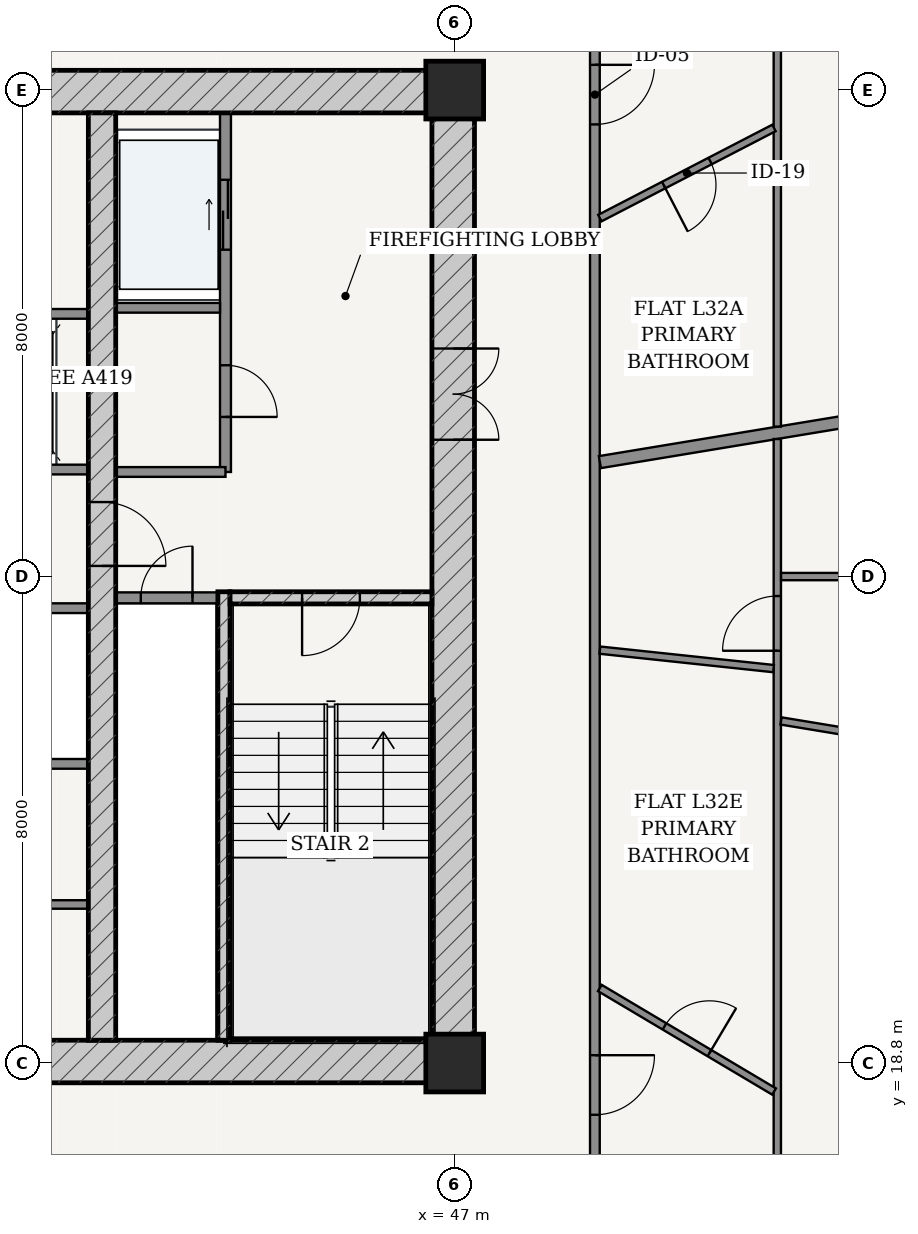
"""IFC4 building model, lengths in metres.
Left out: names, types, materials, properties, quantities, classifications, styles, units other than length and angle.
Written with IfcOpenShell. Run it as: python <this file> out.ifc"""

import sys

from ifc_helpers import new_model, si_unit, direction, frame, frame_2d, origin, origin_2d, place, context, subcontext, project, spatial, rectangle, extrude, source, transform, mapped, element, fill, save


model = new_model("IFC4")
c1 = context("Model", 3, precision=1e-05, world=origin(), true_north=direction((-0.2419218956, 0.970295726276)))
c2 = subcontext(c1, "Body", "Model", "MODEL_VIEW")
j1 = project(units=[si_unit("LENGTHUNIT", "METRE"), si_unit("PLANEANGLEUNIT", "RADIAN")], contexts=[c1])
p1 = place(None, origin())
s1 = spatial("IfcSite", under=j1, at=p1, CompositionType="ELEMENT")
p2 = place(p1, origin())
s2 = spatial("IfcBuilding", under=s1, at=p2, CompositionType="ELEMENT")
p3 = place(p2, frame((0.0, 0.0, 123.0)))
s3 = spatial("IfcBuildingStorey", under=s2, at=p3, CompositionType="ELEMENT", Elevation=123.0)
for number, where, z_axis, x_axis in (
    (1, (47.0, 18.8, 0.0), (0.0, 0.0, 1.0), (1.0, 0.0, 0.0)),
    (2, (47.0, 34.8, 0.0), (0.0, 0.0, 1.0), (1.0, 0.0, 0.0)),
):
    element("IfcColumn", number, at=place(p3, frame(where, z_axis=z_axis, x_axis=x_axis)), inside=s3, PredefinedType="COLUMN", context=c2, shape_type="SweptSolid", body=[
        extrude(rectangle(XDim=0.95, YDim=0.95, at=origin_2d()), origin(), (0.0, 0.0, 1.0), 3.6),
    ])
p4 = place(p3, frame((28.675, 18.825, 0.0), z_axis=(0.0, 0.0, 1.0), x_axis=(1.0, 0.0, 0.0)))
e3 = element("IfcWall", 3, at=p4, inside=s3, PredefinedType="SHEAR", context=c2, shape_type="SweptSolid", body=[
    extrude(rectangle(XDim=18.65, YDim=0.7, at=frame_2d((9.325, 0.0))), origin(), (0.0, 0.0, 1.0), 3.325),
])
p5 = place(p4, frame((8.9, 0.0, 0.0)))
e4 = element("IfcOpeningElement", 4, at=p5, cuts=e3, PredefinedType="OPENING", context=c2, shape_type="SweptSolid", body=[
    extrude(rectangle(XDim=0.85, YDim=2.1, at=frame_2d((0.425, 1.05))), frame((0.0, 0.36, 0.0), z_axis=(0.0, -1.0, 0.0), x_axis=(1.0, 0.0, 0.0)), (0.0, 0.0, 1.0), 0.72),
])
p6 = place(p3, frame((28.675, 34.775, 0.0), z_axis=(0.0, 0.0, 1.0), x_axis=(1.0, 0.0, 0.0)))
e5 = element("IfcWall", 5, at=p6, inside=s3, PredefinedType="SHEAR", context=c2, shape_type="SweptSolid", body=[
    extrude(rectangle(XDim=18.65, YDim=0.7, at=frame_2d((9.325, 0.0))), origin(), (0.0, 0.0, 1.0), 3.325),
])
p7 = place(p6, frame((8.9, 0.0, 0.0)))
e6 = element("IfcOpeningElement", 6, at=p7, cuts=e5, PredefinedType="OPENING", context=c2, shape_type="SweptSolid", body=[
    extrude(rectangle(XDim=0.85, YDim=2.1, at=frame_2d((0.425, 1.05))), frame((0.0, 0.36, 0.0), z_axis=(0.0, -1.0, 0.0), x_axis=(1.0, 0.0, 0.0)), (0.0, 0.0, 1.0), 0.72),
])
p8 = place(p3, frame((46.975, 19.175, 0.0), z_axis=(0.0, 0.0, 1.0), x_axis=(0.0, 1.0, 0.0)))
e7 = element("IfcWall", 7, at=p8, inside=s3, PredefinedType="SHEAR", context=c2, shape_type="SweptSolid", body=[
    extrude(rectangle(XDim=15.25, YDim=0.7, at=frame_2d((7.625, 0.0))), origin(), (0.0, 0.0, 1.0), 3.325),
])
p9 = place(p8, frame((9.875, 0.0, 0.0)))
e8 = element("IfcOpeningElement", 8, at=p9, cuts=e7, PredefinedType="OPENING", context=c2, shape_type="SweptSolid", body=[
    extrude(rectangle(XDim=1.5, YDim=2.2, at=frame_2d((0.75, 1.1))), frame((0.0, 0.36, 0.0), z_axis=(0.0, -1.0, 0.0), x_axis=(1.0, 0.0, 0.0)), (0.0, 0.0, 1.0), 0.72),
])
p10 = place(p3, frame((43.205, 19.175, 0.0), z_axis=(0.0, 0.0, 1.0), x_axis=(0.0, 1.0, 0.0)))
e9 = element("IfcWall", 9, at=p10, inside=s3, PredefinedType="SOLIDWALL", context=c2, shape_type="SweptSolid", body=[
    extrude(rectangle(XDim=7.375, YDim=0.2, at=frame_2d((3.688, 0.0))), origin(), (0.0, 0.0, 1.0), 3.325),
])
p11 = place(p3, frame((43.305, 26.45, 0.0), z_axis=(0.0, 0.0, 1.0), x_axis=(1.0, 0.0, 0.0)))
e10 = element("IfcWall", 10, at=p11, inside=s3, PredefinedType="SOLIDWALL", context=c2, shape_type="SweptSolid", body=[
    extrude(rectangle(XDim=3.32, YDim=0.2, at=frame_2d((1.66, 0.0))), origin(), (0.0, 0.0, 1.0), 3.325),
])
p12 = place(p11, frame((1.185, 0.0, 0.0)))
e11 = element("IfcOpeningElement", 11, at=p12, cuts=e10, PredefinedType="OPENING", context=c2, shape_type="SweptSolid", body=[
    extrude(rectangle(XDim=0.95, YDim=2.15, at=frame_2d((0.475, 1.075))), frame((0.0, 0.11, 0.0), z_axis=(0.0, -1.0, 0.0), x_axis=(1.0, 0.0, 0.0)), (0.0, 0.0, 1.0), 0.22),
])
p13 = place(p3, frame((41.2, 19.175, 0.0), z_axis=(0.0, 0.0, 1.0), x_axis=(0.0, 1.0, 0.0)))
e12 = element("IfcWall", 12, at=p13, inside=s3, PredefinedType="SHEAR", context=c2, shape_type="SweptSolid", body=[
    extrude(rectangle(XDim=15.25, YDim=0.45, at=frame_2d((7.625, 0.0))), origin(), (0.0, 0.0, 1.0), 3.325),
])
p14 = place(p13, frame((7.8, 0.0, 0.0)))
e13 = element("IfcOpeningElement", 13, at=p14, cuts=e12, PredefinedType="OPENING", context=c2, shape_type="SweptSolid", body=[
    extrude(rectangle(XDim=1.05, YDim=2.15, at=frame_2d((0.525, 1.075))), frame((0.0, 0.235, 0.0), z_axis=(0.0, -1.0, 0.0), x_axis=(1.0, 0.0, 0.0)), (0.0, 0.0, 1.0), 0.47),
])
p15 = place(p3, frame((41.425, 26.45, 0.0), z_axis=(0.0, 0.0, 1.0), x_axis=(1.0, 0.0, 0.0)))
e14 = element("IfcWall", 14, at=p15, inside=s3, PredefinedType="PARTITIONING", context=c2, shape_type="SweptSolid", body=[
    extrude(rectangle(XDim=1.675, YDim=0.18, at=frame_2d((0.837, 0.0))), origin(), (0.0, 0.0, 1.0), 3.325),
])
p16 = place(p15, frame((0.413, 0.0, 0.0)))
e15 = element("IfcOpeningElement", 15, at=p16, cuts=e14, PredefinedType="OPENING", context=c2, shape_type="SweptSolid", body=[
    extrude(rectangle(XDim=0.85, YDim=2.1, at=frame_2d((0.425, 1.05))), frame((0.0, 0.1, 0.0), z_axis=(0.0, -1.0, 0.0), x_axis=(1.0, 0.0, 0.0)), (0.0, 0.0, 1.0), 0.2),
])
p17 = place(p3, frame((43.23, 28.52, 0.0), z_axis=(0.0, 0.0, 1.0), x_axis=(0.0, 1.0, 0.0)))
e16 = element("IfcWall", 16, at=p17, inside=s3, PredefinedType="PARTITIONING", context=c2, shape_type="SweptSolid", body=[
    extrude(rectangle(XDim=5.905, YDim=0.18, at=frame_2d((2.953, 0.0))), origin(), (0.0, 0.0, 1.0), 3.325),
])
p18 = place(p17, frame((0.905, 0.0, 0.0)))
e17 = element("IfcOpeningElement", 17, at=p18, cuts=e16, PredefinedType="OPENING", context=c2, shape_type="SweptSolid", body=[
    extrude(rectangle(XDim=0.85, YDim=2.1, at=frame_2d((0.425, 1.05))), frame((0.0, 0.1, 0.0), z_axis=(0.0, -1.0, 0.0), x_axis=(1.0, 0.0, 0.0)), (0.0, 0.0, 1.0), 0.2),
])
p19 = place(p17, frame((3.655, 0.0, 0.0)))
e18 = element("IfcOpeningElement", 18, at=p19, cuts=e16, PredefinedType="OPENING", context=c2, shape_type="SweptSolid", body=[
    extrude(rectangle(XDim=1.15, YDim=2.2, at=frame_2d((0.575, 1.1))), frame((0.0, 0.1, 0.0), z_axis=(0.0, -1.0, 0.0), x_axis=(1.0, 0.0, 0.0)), (0.0, 0.0, 1.0), 0.2),
])
p20 = place(p3, frame((41.425, 31.22, 0.0), z_axis=(0.0, 0.0, 1.0), x_axis=(1.0, 0.0, 0.0)))
e19 = element("IfcWall", 19, at=p20, inside=s3, PredefinedType="PARTITIONING", context=c2, shape_type="SweptSolid", body=[
    extrude(rectangle(XDim=1.715, YDim=0.16, at=frame_2d((0.857, 0.0))), origin(), (0.0, 0.0, 1.0), 3.325),
])
p21 = place(p3, frame((41.425, 28.52, 0.0), z_axis=(0.0, 0.0, 1.0), x_axis=(1.0, 0.0, 0.0)))
e20 = element("IfcWall", 20, at=p21, inside=s3, PredefinedType="PARTITIONING", context=c2, shape_type="SweptSolid", body=[
    extrude(rectangle(XDim=1.805, YDim=0.16, at=frame_2d((0.902, 0.0))), origin(), (0.0, 0.0, 1.0), 3.325),
])
p22 = place(p3, frame((35.025, 28.56, 0.0), z_axis=(0.0, 0.0, 1.0), x_axis=(1.0, 0.0, 0.0)))
e21 = element("IfcWall", 21, at=p22, inside=s3, PredefinedType="PARTITIONING", context=c2, shape_type="SweptSolid", body=[
    extrude(rectangle(XDim=5.95, YDim=0.16, at=frame_2d((2.975, 0.0))), origin(), (0.0, 0.0, 1.0), 3.325),
])
p23 = place(p22, frame((0.76, 0.0, 0.0)))
e22 = element("IfcOpeningElement", 22, at=p23, cuts=e21, PredefinedType="OPENING", context=c2, shape_type="SweptSolid", body=[
    extrude(rectangle(XDim=1.1, YDim=2.2, at=frame_2d((0.55, 1.1))), frame((0.0, 0.09, 0.0), z_axis=(0.0, -1.0, 0.0), x_axis=(1.0, 0.0, 0.0)), (0.0, 0.0, 1.0), 0.18),
])
p24 = place(p22, frame((2.425, 0.0, 0.0)))
e23 = element("IfcOpeningElement", 23, at=p24, cuts=e21, PredefinedType="OPENING", context=c2, shape_type="SweptSolid", body=[
    extrude(rectangle(XDim=1.1, YDim=2.2, at=frame_2d((0.55, 1.1))), frame((0.0, 0.09, 0.0), z_axis=(0.0, -1.0, 0.0), x_axis=(1.0, 0.0, 0.0)), (0.0, 0.0, 1.0), 0.18),
])
p25 = place(p22, frame((4.09, 0.0, 0.0)))
e24 = element("IfcOpeningElement", 24, at=p25, cuts=e21, PredefinedType="OPENING", context=c2, shape_type="SweptSolid", body=[
    extrude(rectangle(XDim=1.1, YDim=2.2, at=frame_2d((0.55, 1.1))), frame((0.0, 0.09, 0.0), z_axis=(0.0, -1.0, 0.0), x_axis=(1.0, 0.0, 0.0)), (0.0, 0.0, 1.0), 0.18),
])
for number, where, z_axis, x_axis in (
    (25, (35.025, 31.12, 0.0), (0.0, 0.0, 1.0), (1.0, 0.0, 0.0)),
    (26, (35.025, 26.28, 0.0), (0.0, 0.0, 1.0), (1.0, 0.0, 0.0)),
    (27, (35.025, 23.72, 0.0), (0.0, 0.0, 1.0), (1.0, 0.0, 0.0)),
):
    element("IfcWall", number, at=place(p3, frame(where, z_axis=z_axis, x_axis=x_axis)), inside=s3, PredefinedType="PARTITIONING", context=c2, shape_type="SweptSolid", body=[
        extrude(rectangle(XDim=5.95, YDim=0.16, at=frame_2d((2.975, 0.0))), origin(), (0.0, 0.0, 1.0), 3.325),
    ])
p26 = place(p3, frame((35.025, 21.407, 0.0), z_axis=(0.0, 0.0, 1.0), x_axis=(1.0, 0.0, 0.0)))
e28 = element("IfcWall", 28, at=p26, inside=s3, PredefinedType="PARTITIONING", context=c2, shape_type="SweptSolid", body=[
    extrude(rectangle(XDim=5.95, YDim=0.14, at=frame_2d((2.975, 0.0))), origin(), (0.0, 0.0, 1.0), 3.325),
])
p27 = place(p26, frame((2.55, 0.0, 0.0)))
e29 = element("IfcOpeningElement", 29, at=p27, cuts=e28, PredefinedType="OPENING", context=c2, shape_type="SweptSolid", body=[
    extrude(rectangle(XDim=0.85, YDim=2.1, at=frame_2d((0.425, 1.05))), frame((0.0, 0.08, 0.0), z_axis=(0.0, -1.0, 0.0), x_axis=(1.0, 0.0, 0.0)), (0.0, 0.0, 1.0), 0.16),
])
p28 = place(p3, frame((49.305, 16.575, 0.0), z_axis=(0.0, 0.0, 1.0), x_axis=(0.0, 1.0, 0.0)))
e30 = element("IfcWall", 30, at=p28, inside=s3, PredefinedType="PARTITIONING", context=c2, shape_type="SweptSolid", body=[
    extrude(rectangle(XDim=20.45, YDim=0.16, at=frame_2d((10.225, 0.0))), origin(), (0.0, 0.0, 1.0), 2.767),
])
p29 = place(p28, frame((17.66, 0.0, 0.0)))
e31 = element("IfcOpeningElement", 31, at=p29, cuts=e30, PredefinedType="OPENING", context=c2, shape_type="SweptSolid", body=[
    extrude(rectangle(XDim=0.98, YDim=2.2, at=frame_2d((0.49, 1.1))), frame((0.0, 0.09, 0.0), z_axis=(0.0, -1.0, 0.0), x_axis=(1.0, 0.0, 0.0)), (0.0, 0.0, 1.0), 0.18),
])
p30 = place(p28, frame((1.374, 0.0, 0.0)))
e32 = element("IfcOpeningElement", 32, at=p30, cuts=e30, PredefinedType="OPENING", context=c2, shape_type="SweptSolid", body=[
    extrude(rectangle(XDim=0.98, YDim=2.2, at=frame_2d((0.49, 1.1))), frame((0.0, 0.09, 0.0), z_axis=(0.0, -1.0, 0.0), x_axis=(1.0, 0.0, 0.0)), (0.0, 0.0, 1.0), 0.18),
])
p31 = place(p3, frame((49.387, 28.682, 0.0), z_axis=(0.0, 0.0, 1.0), x_axis=(0.986617934215, 0.163049231479, 0.0)))
e33 = element("IfcWall", 33, at=p31, inside=s3, PredefinedType="PARTITIONING", context=c2, shape_type="SweptSolid", body=[
    extrude(rectangle(XDim=14.785, YDim=0.2, at=frame_2d((7.392, 0.0))), origin(), (0.0, 0.0, 1.0), 2.767),
])
p32 = place(p3, frame((52.305, 40.105, 0.0), z_axis=(0.0, 0.0, 1.0), x_axis=(0.0, -1.0, 0.0)))
e34 = element("IfcWall", 34, at=p32, inside=s3, PredefinedType="PARTITIONING", context=c2, shape_type="SweptSolid", body=[
    extrude(rectangle(XDim=10.839, YDim=0.12, at=frame_2d((5.419, 0.0))), origin(), (0.0, 0.0, 1.0), 2.767),
])
p33 = place(p32, frame((2.675, 0.0, 0.0)))
e35 = element("IfcOpeningElement", 35, at=p33, cuts=e34, PredefinedType="OPENING", context=c2, shape_type="SweptSolid", body=[
    extrude(rectangle(XDim=0.9, YDim=2.15, at=frame_2d((0.45, 1.075))), frame((0.0, 0.07, 0.0), z_axis=(0.0, -1.0, 0.0), x_axis=(1.0, 0.0, 0.0)), (0.0, 0.0, 1.0), 0.14),
])
p34 = place(p3, frame((49.387, 32.695, 0.0), z_axis=(0.0, 0.0, 1.0), x_axis=(0.888069491277, 0.459709232737, 0.0)))
e36 = element("IfcWall", 36, at=p34, inside=s3, PredefinedType="PARTITIONING", context=c2, shape_type="SweptSolid", body=[
    extrude(rectangle(XDim=3.224, YDim=0.12, at=frame_2d((1.612, 0.0))), origin(), (0.0, 0.0, 1.0), 3.325),
])
p35 = place(p34, frame((1.182, 0.0, 0.0)))
e37 = element("IfcOpeningElement", 37, at=p35, cuts=e36, PredefinedType="OPENING", context=c2, shape_type="SweptSolid", body=[
    extrude(rectangle(XDim=0.86, YDim=2.15, at=frame_2d((0.43, 1.075))), frame((0.0, 0.07, 0.0), z_axis=(0.0, -1.0, 0.0), x_axis=(1.0, 0.0, 0.0)), (0.0, 0.0, 1.0), 0.14),
])
p36 = place(p3, frame((52.305, 29.062, 0.0), z_axis=(0.0, 0.0, 1.0), x_axis=(0.0, -1.0, 0.0)))
e38 = element("IfcWall", 38, at=p36, inside=s3, PredefinedType="PARTITIONING", context=c2, shape_type="SweptSolid", body=[
    extrude(rectangle(XDim=15.567, YDim=0.12, at=frame_2d((7.783, 0.0))), origin(), (0.0, 0.0, 1.0), 2.767),
])
p37 = place(p36, frame((12.535, 0.0, 0.0)))
e39 = element("IfcOpeningElement", 39, at=p37, cuts=e38, PredefinedType="OPENING", context=c2, shape_type="SweptSolid", body=[
    extrude(rectangle(XDim=0.9, YDim=2.15, at=frame_2d((0.45, 1.075))), frame((0.0, 0.07, 0.0), z_axis=(0.0, -1.0, 0.0), x_axis=(1.0, 0.0, 0.0)), (0.0, 0.0, 1.0), 0.14),
])
p38 = place(p36, frame((2.582, 0.0, 0.0)))
e40 = element("IfcOpeningElement", 40, at=p38, cuts=e38, PredefinedType="OPENING", context=c2, shape_type="SweptSolid", body=[
    extrude(rectangle(XDim=0.9, YDim=2.15, at=frame_2d((0.45, 1.075))), frame((0.0, 0.07, 0.0), z_axis=(0.0, -1.0, 0.0), x_axis=(1.0, 0.0, 0.0)), (0.0, 0.0, 1.0), 0.14),
])
p39 = place(p3, frame((52.366, 24.426, 0.0), z_axis=(0.0, 0.0, 1.0), x_axis=(0.986619012175, -0.163042708564, 0.0)))
e41 = element("IfcWall", 41, at=p39, inside=s3, PredefinedType="PARTITIONING", context=c2, shape_type="SweptSolid", body=[
    extrude(rectangle(XDim=11.765, YDim=0.12, at=frame_2d((5.883, 0.0))), origin(), (0.0, 0.0, 1.0), 2.767),
])
p40 = place(p39, frame((4.359, 0.0, 0.0)))
e42 = element("IfcOpeningElement", 42, at=p40, cuts=e41, PredefinedType="OPENING", context=c2, shape_type="SweptSolid", body=[
    extrude(rectangle(XDim=0.9, YDim=2.15, at=frame_2d((0.45, 1.075))), frame((0.0, 0.07, 0.0), z_axis=(0.0, -1.0, 0.0), x_axis=(1.0, 0.0, 0.0)), (0.0, 0.0, 1.0), 0.14),
])
p41 = place(p3, frame((52.367, 26.8, 0.0), z_axis=(0.0, 0.0, 1.0), x_axis=(1.0, 0.0, 0.0)))
e43 = element("IfcWall", 43, at=p41, inside=s3, PredefinedType="PARTITIONING", context=c2, shape_type="SweptSolid", body=[
    extrude(rectangle(XDim=12.173, YDim=0.12, at=frame_2d((6.086, 0.0))), origin(), (0.0, 0.0, 1.0), 2.767),
])
p42 = place(p41, frame((5.636, 0.0, 0.0)))
e44 = element("IfcOpeningElement", 44, at=p42, cuts=e43, PredefinedType="OPENING", context=c2, shape_type="SweptSolid", body=[
    extrude(rectangle(XDim=0.9, YDim=2.15, at=frame_2d((0.45, 1.075))), frame((0.0, 0.07, 0.0), z_axis=(0.0, -1.0, 0.0), x_axis=(1.0, 0.0, 0.0)), (0.0, 0.0, 1.0), 0.14),
])
p43 = place(p3, frame((49.387, 20.034, 0.0), z_axis=(0.0, 0.0, 1.0), x_axis=(0.859682842925, -0.510828160521, 0.0)))
e45 = element("IfcWall", 45, at=p43, inside=s3, PredefinedType="PARTITIONING", context=c2, shape_type="SweptSolid", body=[
    extrude(rectangle(XDim=3.333, YDim=0.12, at=frame_2d((1.666, 0.0))), origin(), (0.0, 0.0, 1.0), 3.325),
])
p44 = place(p43, frame((1.236, 0.0, 0.0)))
e46 = element("IfcOpeningElement", 46, at=p44, cuts=e45, PredefinedType="OPENING", context=c2, shape_type="SweptSolid", body=[
    extrude(rectangle(XDim=0.86, YDim=2.15, at=frame_2d((0.43, 1.075))), frame((0.0, 0.07, 0.0), z_axis=(0.0, -1.0, 0.0), x_axis=(1.0, 0.0, 0.0)), (0.0, 0.0, 1.0), 0.14),
])
p45 = place(p3, frame((49.387, 25.59, 0.0), z_axis=(0.0, 0.0, 1.0), x_axis=(0.99440393079, -0.105644793673, 0.0)))
e47 = element("IfcWall", 47, at=p45, inside=s3, PredefinedType="PARTITIONING", context=c2, shape_type="SweptSolid", body=[
    extrude(rectangle(XDim=2.873, YDim=0.12, at=frame_2d((1.436, 0.0))), origin(), (0.0, 0.0, 1.0), 3.325),
])
m1 = source(origin(), c2, "Body", "SweptSolid", [
    extrude(rectangle(XDim=1.5, YDim=2.2, at=frame_2d((0.75, 1.1))), frame((0.0, 0.025, 0.0), z_axis=(0.0, -1.0, 0.0), x_axis=(1.0, 0.0, 0.0)), (0.0, 0.0, 1.0), 0.05),
])
p46 = place(p9, frame((1.5, 0.0, 0.0), z_axis=(0.0, 0.0, 1.0), x_axis=(-1.0, 0.0, 0.0)))
e48 = element("IfcDoor", 48, at=p46, inside=s3, OperationType="DOUBLE_DOOR_SINGLE_SWING", PredefinedType="DOOR", context=c2, shape_type="MappedRepresentation", body=[
    mapped(m1, transform((0.0, 0.0, 0.0), scale=1.0)),
])
fill(e8, e48)
m2 = source(origin(), c2, "Body", "SweptSolid", [
    extrude(rectangle(XDim=1.05, YDim=2.15, at=frame_2d((0.525, 1.075))), frame((0.0, 0.025, 0.0), z_axis=(0.0, -1.0, 0.0), x_axis=(1.0, 0.0, 0.0)), (0.0, 0.0, 1.0), 0.05),
])
p47 = place(p14, frame((1.05, 0.0, 0.0), z_axis=(0.0, 0.0, 1.0), x_axis=(-1.0, 0.0, 0.0)))
e49 = element("IfcDoor", 49, at=p47, inside=s3, OperationType="SINGLE_SWING_RIGHT", PredefinedType="DOOR", context=c2, shape_type="MappedRepresentation", body=[
    mapped(m2, transform((0.0, 0.0, 0.0), scale=1.0)),
])
fill(e13, e49)
m3 = source(origin(), c2, "Body", "SweptSolid", [
    extrude(rectangle(XDim=0.95, YDim=2.15, at=frame_2d((0.475, 1.075))), frame((0.0, 0.025, 0.0), z_axis=(0.0, -1.0, 0.0), x_axis=(1.0, 0.0, 0.0)), (0.0, 0.0, 1.0), 0.05),
])
p48 = place(p12, frame((0.95, 0.0, 0.0), z_axis=(0.0, 0.0, 1.0), x_axis=(-1.0, 0.0, 0.0)))
e50 = element("IfcDoor", 50, at=p48, inside=s3, OperationType="SINGLE_SWING_RIGHT", PredefinedType="DOOR", context=c2, shape_type="MappedRepresentation", body=[
    mapped(m3, transform((0.0, 0.0, 0.0), scale=1.0)),
])
fill(e11, e50)
m4 = source(origin(), c2, "Body", "SweptSolid", [
    extrude(rectangle(XDim=0.85, YDim=2.1, at=frame_2d((0.425, 1.05))), frame((0.0, 0.025, 0.0), z_axis=(0.0, -1.0, 0.0), x_axis=(1.0, 0.0, 0.0)), (0.0, 0.0, 1.0), 0.05),
])
p49 = place(p16, origin())
e51 = element("IfcDoor", 51, at=p49, inside=s3, OperationType="SINGLE_SWING_RIGHT", PredefinedType="DOOR", context=c2, shape_type="MappedRepresentation", body=[
    mapped(m4, transform((0.0, 0.0, 0.0), scale=1.0)),
])
fill(e15, e51)
p50 = place(p18, frame((0.85, 0.0, 0.0), z_axis=(0.0, 0.0, 1.0), x_axis=(-1.0, 0.0, 0.0)))
e52 = element("IfcDoor", 52, at=p50, inside=s3, OperationType="SINGLE_SWING_RIGHT", PredefinedType="DOOR", context=c2, shape_type="MappedRepresentation", body=[
    mapped(m4, transform((0.0, 0.0, 0.0), scale=1.0)),
])
fill(e17, e52)
m5 = source(origin(), c2, "Body", "SweptSolid", [
    extrude(rectangle(XDim=1.15, YDim=2.2, at=frame_2d((0.575, 1.1))), frame((0.0, 0.025, 0.0), z_axis=(0.0, -1.0, 0.0), x_axis=(1.0, 0.0, 0.0)), (0.0, 0.0, 1.0), 0.05),
])
p51 = place(p19, origin())
e53 = element("IfcDoor", 53, at=p51, inside=s3, OperationType="DOUBLE_DOOR_SLIDING", PredefinedType="DOOR", context=c2, shape_type="MappedRepresentation", body=[
    mapped(m5, transform((0.0, 0.0, 0.0), scale=1.0)),
])
fill(e18, e53)
m6 = source(origin(), c2, "Body", "SweptSolid", [
    extrude(rectangle(XDim=0.98, YDim=2.2, at=frame_2d((0.49, 1.1))), frame((0.0, 0.025, 0.0), z_axis=(0.0, -1.0, 0.0), x_axis=(1.0, 0.0, 0.0)), (0.0, 0.0, 1.0), 0.05),
])
p52 = place(p29, frame((0.98, 0.0, 0.0), z_axis=(0.0, 0.0, 1.0), x_axis=(-1.0, 0.0, 0.0)))
e54 = element("IfcDoor", 54, at=p52, inside=s3, OperationType="SINGLE_SWING_LEFT", PredefinedType="DOOR", context=c2, shape_type="MappedRepresentation", body=[
    mapped(m6, transform((0.0, 0.0, 0.0), scale=1.0)),
])
fill(e31, e54)
m7 = source(origin(), c2, "Body", "SweptSolid", [
    extrude(rectangle(XDim=0.86, YDim=2.15, at=frame_2d((0.43, 1.075))), frame((0.0, 0.025, 0.0), z_axis=(0.0, -1.0, 0.0), x_axis=(1.0, 0.0, 0.0)), (0.0, 0.0, 1.0), 0.05),
])
p53 = place(p35, frame((0.86, 0.0, 0.0), z_axis=(0.0, 0.0, 1.0), x_axis=(-1.0, 0.0, 0.0)))
e55 = element("IfcDoor", 55, at=p53, inside=s3, OperationType="SINGLE_SWING_RIGHT", PredefinedType="DOOR", context=c2, shape_type="MappedRepresentation", body=[
    mapped(m7, transform((0.0, 0.0, 0.0), scale=1.0)),
])
fill(e37, e55)
p54 = place(p30, frame((0.98, 0.0, 0.0), z_axis=(0.0, 0.0, 1.0), x_axis=(-1.0, 0.0, 0.0)))
e56 = element("IfcDoor", 56, at=p54, inside=s3, OperationType="SINGLE_SWING_LEFT", PredefinedType="DOOR", context=c2, shape_type="MappedRepresentation", body=[
    mapped(m6, transform((0.0, 0.0, 0.0), scale=1.0)),
])
fill(e32, e56)
p55 = place(p44, origin())
e57 = element("IfcDoor", 57, at=p55, inside=s3, OperationType="SINGLE_SWING_RIGHT", PredefinedType="DOOR", context=c2, shape_type="MappedRepresentation", body=[
    mapped(m7, transform((0.0, 0.0, 0.0), scale=1.0)),
])
fill(e46, e57)
m8 = source(origin(), c2, "Body", "SweptSolid", [
    extrude(rectangle(XDim=0.9, YDim=2.15, at=frame_2d((0.45, 1.075))), frame((0.0, 0.025, 0.0), z_axis=(0.0, -1.0, 0.0), x_axis=(1.0, 0.0, 0.0)), (0.0, 0.0, 1.0), 0.05),
])
p56 = place(p38, frame((0.9, 0.0, 0.0), z_axis=(0.0, 0.0, 1.0), x_axis=(-1.0, 0.0, 0.0)))
e58 = element("IfcDoor", 58, at=p56, inside=s3, OperationType="SINGLE_SWING_LEFT", PredefinedType="DOOR", context=c2, shape_type="MappedRepresentation", body=[
    mapped(m8, transform((0.0, 0.0, 0.0), scale=1.0)),
])
fill(e40, e58)
save(model, sys.argv[1])
